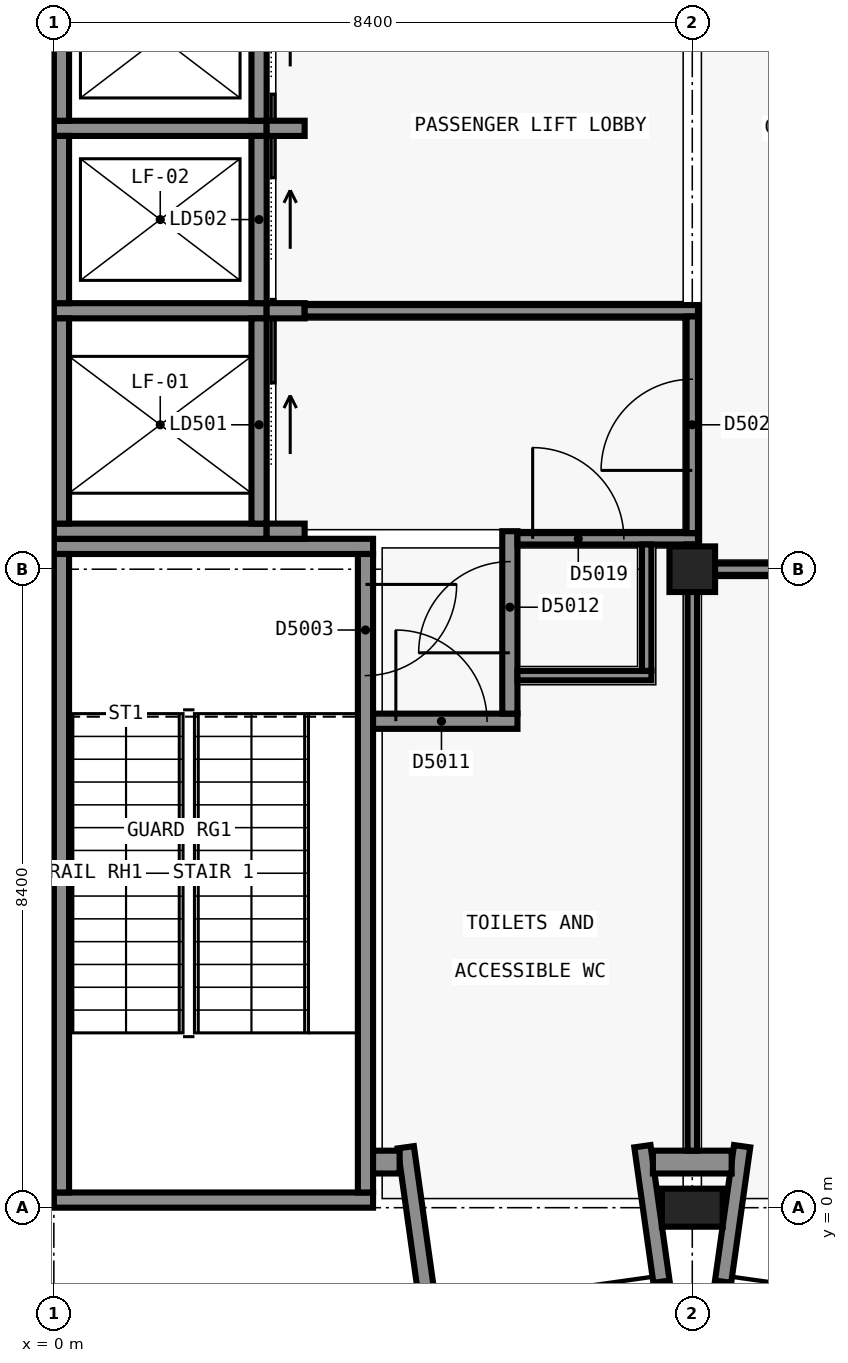
"""IFC4 building model, lengths in metres.
Left out: names, types, materials, properties, quantities, classifications, styles, units other than length and angle.
Written with IfcOpenShell. Run it as: python <this file> out.ifc"""

import sys

from ifc_helpers import new_model, si_unit, direction, frame, frame_2d, origin, origin_2d, place, context, subcontext, project, spatial, rectangle, extrude, element, fill, save


model = new_model("IFC4")
c1 = context("Model", 3, precision=1e-05, world=origin(), true_north=direction((0.0, 1.0)))
c2 = subcontext(c1, "Body", "Model", "MODEL_VIEW")
j1 = project(units=[si_unit("LENGTHUNIT", "METRE"), si_unit("PLANEANGLEUNIT", "RADIAN")], contexts=[c1])
p1 = place(None, origin())
s1 = spatial("IfcSite", under=j1, at=p1, CompositionType="ELEMENT")
p2 = place(p1, origin())
s2 = spatial("IfcBuilding", under=s1, at=p2, CompositionType="ELEMENT")
p3 = place(p2, frame((0.0, 0.0, 24.6)))
s3 = spatial("IfcBuildingStorey", under=s2, at=p3, CompositionType="ELEMENT", Elevation=24.6)
for number, where, z_axis, x_axis in (
    (1, (4.2, 0.1, 0.0), (0.0, 0.0, 1.0), (-1.0, 0.0, 0.0)),
    (2, (0.0, 8.7, 0.0), (0.0, 0.0, 1.0), (1.0, 0.0, 0.0)),
):
    element("IfcWall", number, at=place(p3, frame(where, z_axis=z_axis, x_axis=x_axis)), inside=s3, PredefinedType="SHEAR", context=c2, shape_type="SweptSolid", body=[
        extrude(rectangle(XDim=4.199, YDim=0.2, at=frame_2d((2.1, 0.0))), origin(), (0.0, 0.0, 1.0), 4.5),
    ])
p4 = place(p3, frame((0.1, 0.2, 0.0), z_axis=(0.0, 0.0, 1.0), x_axis=(0.0, 1.0, 0.0)))
e3 = element("IfcWall", 3, at=p4, inside=s3, PredefinedType="SHEAR", context=c2, shape_type="SweptSolid", body=[
    extrude(rectangle(XDim=8.4, YDim=0.2, at=frame_2d((4.2, 0.0))), origin(), (0.0, 0.0, 1.0), 4.5),
])
p5 = place(p3, frame((4.1, 8.6, 0.0), z_axis=(0.0, 0.0, 1.0), x_axis=(0.0, -1.0, 0.0)))
e4 = element("IfcWall", 4, at=p5, inside=s3, PredefinedType="SHEAR", context=c2, shape_type="SweptSolid", body=[
    extrude(rectangle(XDim=8.4, YDim=0.2, at=frame_2d((4.2, 0.0))), origin(), (0.0, 0.0, 1.0), 4.5),
])
p6 = place(p5, frame((0.4, 0.0, 0.0)))
e5 = element("IfcOpeningElement", 5, at=p6, cuts=e4, PredefinedType="OPENING", context=c2, shape_type="SweptSolid", body=[
    extrude(rectangle(XDim=1.2, YDim=2.1, at=frame_2d((0.6, 1.05))), frame((0.0, 0.11, 0.0), z_axis=(0.0, -1.0, 0.0), x_axis=(1.0, 0.0, 0.0)), (0.0, 0.0, 1.0), 0.22),
])
for number, where, z_axis, x_axis in (
    (6, (2.8, 8.9, 0.0), (0.0, 0.0, 1.0), (-1.0, 0.0, 0.0)),
    (7, (0.0, 11.8, 0.0), (0.0, 0.0, 1.0), (1.0, 0.0, 0.0)),
):
    element("IfcWall", number, at=place(p3, frame(where, z_axis=z_axis, x_axis=x_axis)), inside=s3, PredefinedType="SHEAR", context=c2, shape_type="SweptSolid", body=[
        extrude(rectangle(XDim=2.8, YDim=0.2, at=frame_2d((1.4, 0.0))), origin(), (0.0, 0.0, 1.0), 4.5),
    ])
p7 = place(p3, frame((0.1, 9.0, 0.0), z_axis=(0.0, 0.0, 1.0), x_axis=(0.0, 1.0, 0.0)))
e8 = element("IfcWall", 8, at=p7, inside=s3, PredefinedType="SHEAR", context=c2, shape_type="SweptSolid", body=[
    extrude(rectangle(XDim=2.7, YDim=0.2, at=frame_2d((1.35, 0.0))), origin(), (0.0, 0.0, 1.0), 4.5),
])
p8 = place(p3, frame((2.7, 11.7, 0.0), z_axis=(0.0, 0.0, 1.0), x_axis=(0.0, -1.0, 0.0)))
e9 = element("IfcWall", 9, at=p8, inside=s3, PredefinedType="SHEAR", context=c2, shape_type="SweptSolid", body=[
    extrude(rectangle(XDim=2.7, YDim=0.2, at=frame_2d((1.35, 0.0))), origin(), (0.0, 0.0, 1.0), 4.5),
])
p9 = place(p8, frame((0.85, 0.0, 0.0)))
e10 = element("IfcOpeningElement", 10, at=p9, cuts=e9, PredefinedType="OPENING", context=c2, shape_type="SweptSolid", body=[
    extrude(rectangle(XDim=1.1, YDim=2.1, at=frame_2d((0.55, 1.05))), frame((0.0, 0.11, 0.0), z_axis=(0.0, -1.0, 0.0), x_axis=(1.0, 0.0, 0.0)), (0.0, 0.0, 1.0), 0.22),
])
p10 = place(p3, frame((0.0, 14.2, 0.0), z_axis=(0.0, 0.0, 1.0), x_axis=(1.0, 0.0, 0.0)))
e11 = element("IfcWall", 11, at=p10, inside=s3, PredefinedType="SHEAR", context=c2, shape_type="SweptSolid", body=[
    extrude(rectangle(XDim=2.8, YDim=0.2, at=frame_2d((1.4, 0.0))), origin(), (0.0, 0.0, 1.0), 4.5),
])
p11 = place(p3, frame((0.1, 11.9, 0.0), z_axis=(0.0, 0.0, 1.0), x_axis=(0.0, 1.0, 0.0)))
e12 = element("IfcWall", 12, at=p11, inside=s3, PredefinedType="SHEAR", context=c2, shape_type="SweptSolid", body=[
    extrude(rectangle(XDim=2.2, YDim=0.2, at=frame_2d((1.1, 0.0))), origin(), (0.0, 0.0, 1.0), 4.5),
])
p12 = place(p3, frame((2.7, 14.1, 0.0), z_axis=(0.0, 0.0, 1.0), x_axis=(0.0, -1.0, 0.0)))
e13 = element("IfcWall", 13, at=p12, inside=s3, PredefinedType="SHEAR", context=c2, shape_type="SweptSolid", body=[
    extrude(rectangle(XDim=2.2, YDim=0.2, at=frame_2d((1.1, 0.0))), origin(), (0.0, 0.0, 1.0), 4.5),
])
p13 = place(p12, frame((0.55, 0.0, 0.0)))
e14 = element("IfcOpeningElement", 14, at=p13, cuts=e13, PredefinedType="OPENING", context=c2, shape_type="SweptSolid", body=[
    extrude(rectangle(XDim=1.1, YDim=2.1, at=frame_2d((0.55, 1.05))), frame((0.0, 0.11, 0.0), z_axis=(0.0, -1.0, 0.0), x_axis=(1.0, 0.0, 0.0)), (0.0, 0.0, 1.0), 0.22),
])
p14 = place(p3, frame((0.1, 14.3, 0.0), z_axis=(0.0, 0.0, 1.0), x_axis=(0.0, 1.0, 0.0)))
e15 = element("IfcWall", 15, at=p14, inside=s3, PredefinedType="SHEAR", context=c2, shape_type="SweptSolid", body=[
    extrude(rectangle(XDim=2.1, YDim=0.2, at=frame_2d((1.05, 0.0))), origin(), (0.0, 0.0, 1.0), 4.5),
])
p15 = place(p3, frame((2.7, 16.4, 0.0), z_axis=(0.0, 0.0, 1.0), x_axis=(0.0, -1.0, 0.0)))
e16 = element("IfcWall", 16, at=p15, inside=s3, PredefinedType="SHEAR", context=c2, shape_type="SweptSolid", body=[
    extrude(rectangle(XDim=2.1, YDim=0.2, at=frame_2d((1.05, 0.0))), origin(), (0.0, 0.0, 1.0), 4.5),
])
p16 = place(p15, frame((0.45, 0.0, 0.0)))
e17 = element("IfcOpeningElement", 17, at=p16, cuts=e16, PredefinedType="OPENING", context=c2, shape_type="SweptSolid", body=[
    extrude(rectangle(XDim=1.1, YDim=2.1, at=frame_2d((0.55, 1.05))), frame((0.0, 0.11, 0.0), z_axis=(0.0, -1.0, 0.0), x_axis=(1.0, 0.0, 0.0)), (0.0, 0.0, 1.0), 0.22),
])
p17 = place(p3, frame((8.4, 0.0, 0.0), z_axis=(0.0, 0.0, 1.0), x_axis=(1.0, 0.0, 0.0)))
e18 = element("IfcColumn", 18, at=p17, inside=s3, PredefinedType="COLUMN", context=c2, shape_type="SweptSolid", body=[
    extrude(rectangle(XDim=0.8, YDim=0.5, at=origin_2d()), origin(), (0.0, 0.0, 1.0), 4.5),
])
p18 = place(p3, frame((8.4, 8.4, 0.0), z_axis=(0.0, 0.0, 1.0), x_axis=(1.0, 0.0, 0.0)))
e19 = element("IfcColumn", 19, at=p18, inside=s3, PredefinedType="COLUMN", context=c2, shape_type="SweptSolid", body=[
    extrude(rectangle(XDim=0.6, YDim=0.6, at=origin_2d()), origin(), (0.0, 0.0, 1.0), 4.5),
])
for number, where, z_axis, x_axis in (
    (20, (3.3, 8.9, 0.0), (0.0, 0.0, 1.0), (-1.0, 0.0, 0.0)),
    (21, (2.8, 11.8, 0.0), (0.0, 0.0, 1.0), (1.0, 0.0, 0.0)),
    (22, (2.8, 14.2, 0.0), (0.0, 0.0, 1.0), (1.0, 0.0, 0.0)),
):
    element("IfcWall", number, at=place(p3, frame(where, z_axis=z_axis, x_axis=x_axis)), inside=s3, PredefinedType="SHEAR", context=c2, shape_type="SweptSolid", body=[
        extrude(rectangle(XDim=0.5, YDim=0.2, at=frame_2d((0.25, 0.0))), origin(), (0.0, 0.0, 1.0), 4.5),
    ])
p19 = place(p3, frame((4.631, 0.795, 0.0), z_axis=(0.0, 0.0, 1.0), x_axis=(0.139141913905, -0.990272451295, 0.0)))
e23 = element("IfcWall", 23, at=p19, inside=s3, PredefinedType="SOLIDWALL", context=c2, shape_type="SweptSolid", body=[
    extrude(rectangle(XDim=2.219, YDim=0.215, at=frame_2d((1.11, 0.0))), origin(), (0.0, 0.0, 1.0), 4.2),
])
for number, where, z_axis, x_axis in (
    (24, (7.744, 0.809, 0.0), (0.0, 0.0, 1.0), (0.139, -0.99, 0.0)),
    (25, (9.056, 0.809, 0.0), (0.0, 0.0, 1.0), (-0.139, -0.99, 0.0)),
):
    element("IfcWall", number, at=place(p3, frame(where, z_axis=z_axis, x_axis=x_axis)), inside=s3, PredefinedType="SOLIDWALL", context=c2, shape_type="SweptSolid", body=[
        extrude(rectangle(XDim=1.8, YDim=0.215, at=frame_2d((0.9, 0.0))), origin(), (0.0, 0.0, 1.0), 4.2),
    ])
p20 = place(p3, frame((4.55, 0.6, 0.0), z_axis=(0.0, 0.0, 1.0), x_axis=(-1.0, 0.0, 0.0)))
e26 = element("IfcWall", 26, at=p20, inside=s3, PredefinedType="SOLIDWALL", context=c2, shape_type="SweptSolid", body=[
    extrude(rectangle(XDim=0.349, YDim=0.3, at=frame_2d((0.175, 0.0))), origin(), (0.0, 0.0, 1.0), 4.2),
])
p21 = place(p3, frame((8.918, 0.6, 0.0), z_axis=(0.0, 0.0, 1.0), x_axis=(-1.0, 0.0, 0.0)))
e27 = element("IfcWall", 27, at=p21, inside=s3, PredefinedType="SOLIDWALL", context=c2, shape_type="SweptSolid", body=[
    extrude(rectangle(XDim=1.036, YDim=0.3, at=frame_2d((0.518, 0.0))), origin(), (0.0, 0.0, 1.0), 4.2),
])
p22 = place(p3, frame((4.2, 6.4, 0.0), z_axis=(0.0, 0.0, 1.0), x_axis=(1.0, 0.0, 0.0)))
e28 = element("IfcWall", 28, at=p22, inside=s3, PredefinedType="SOLIDWALL", context=c2, shape_type="SweptSolid", body=[
    extrude(rectangle(XDim=1.9, YDim=0.2, at=frame_2d((0.95, 0.0))), origin(), (0.0, 0.0, 1.0), 4.2),
])
p23 = place(p22, frame((0.3, 0.0, 0.0)))
e29 = element("IfcOpeningElement", 29, at=p23, cuts=e28, PredefinedType="OPENING", context=c2, shape_type="SweptSolid", body=[
    extrude(rectangle(XDim=1.2, YDim=2.1, at=frame_2d((0.6, 1.05))), frame((0.0, 0.11, 0.0), z_axis=(0.0, -1.0, 0.0), x_axis=(1.0, 0.0, 0.0)), (0.0, 0.0, 1.0), 0.22),
])
p24 = place(p3, frame((6.0, 6.5, 0.0), z_axis=(0.0, 0.0, 1.0), x_axis=(0.0, 1.0, 0.0)))
e30 = element("IfcWall", 30, at=p24, inside=s3, PredefinedType="SOLIDWALL", context=c2, shape_type="SweptSolid", body=[
    extrude(rectangle(XDim=2.4, YDim=0.2, at=frame_2d((1.2, 0.0))), origin(), (0.0, 0.0, 1.0), 3.7),
])
p25 = place(p24, frame((0.8, 0.0, 0.0)))
e31 = element("IfcOpeningElement", 31, at=p25, cuts=e30, PredefinedType="OPENING", context=c2, shape_type="SweptSolid", body=[
    extrude(rectangle(XDim=1.2, YDim=2.1, at=frame_2d((0.6, 1.05))), frame((0.0, 0.11, 0.0), z_axis=(0.0, -1.0, 0.0), x_axis=(1.0, 0.0, 0.0)), (0.0, 0.0, 1.0), 0.22),
])
p26 = place(p3, frame((8.325, 8.4, 0.0), z_axis=(0.0, 0.0, 1.0), x_axis=(1.0, 0.0, 0.0)))
e32 = element("IfcWall", 32, at=p26, inside=s3, PredefinedType="PARTITIONING", context=c2, shape_type="SweptSolid", body=[
    extrude(rectangle(XDim=4.35, YDim=0.15, at=frame_2d((2.175, 0.0))), origin(), (0.0, 0.0, 1.0), 3.5),
])
p27 = place(p3, frame((6.1, 8.8, 0.0), z_axis=(0.0, 0.0, 1.0), x_axis=(1.0, 0.0, 0.0)))
e33 = element("IfcWall", 33, at=p27, inside=s3, PredefinedType="SOLIDWALL", context=c2, shape_type="SweptSolid", body=[
    extrude(rectangle(XDim=2.375, YDim=0.15, at=frame_2d((1.188, 0.0))), origin(), (0.0, 0.0, 1.0), 3.5),
])
p28 = place(p27, frame((0.2, 0.0, 0.0)))
e34 = element("IfcOpeningElement", 34, at=p28, cuts=e33, PredefinedType="OPENING", context=c2, shape_type="SweptSolid", body=[
    extrude(rectangle(XDim=1.2, YDim=2.1, at=frame_2d((0.6, 1.05))), frame((0.0, 0.085, 0.0), z_axis=(0.0, -1.0, 0.0), x_axis=(1.0, 0.0, 0.0)), (0.0, 0.0, 1.0), 0.17),
])
p29 = place(p3, frame((3.3, 11.8, 0.0), z_axis=(0.0, 0.0, 1.0), x_axis=(1.0, 0.0, 0.0)))
e35 = element("IfcWall", 35, at=p29, inside=s3, PredefinedType="SOLIDWALL", context=c2, shape_type="SweptSolid", body=[
    extrude(rectangle(XDim=5.175, YDim=0.15, at=frame_2d((2.587, 0.0))), origin(), (0.0, 0.0, 1.0), 3.5),
])
p30 = place(p3, frame((8.4, 8.475, 0.0), z_axis=(0.0, 0.0, 1.0), x_axis=(0.0, 1.0, 0.0)))
e36 = element("IfcWall", 36, at=p30, inside=s3, PredefinedType="PARTITIONING", context=c2, shape_type="SweptSolid", body=[
    extrude(rectangle(XDim=0.25, YDim=0.15, at=frame_2d((0.125, 0.0))), origin(), (0.0, 0.0, 1.0), 3.5),
])
p31 = place(p3, frame((8.4, 8.875, 0.0), z_axis=(0.0, 0.0, 1.0), x_axis=(0.0, 1.0, 0.0)))
e37 = element("IfcWall", 37, at=p31, inside=s3, PredefinedType="SOLIDWALL", context=c2, shape_type="SweptSolid", body=[
    extrude(rectangle(XDim=2.85, YDim=0.15, at=frame_2d((1.425, 0.0))), origin(), (0.0, 0.0, 1.0), 3.5),
])
p32 = place(p31, frame((0.825, 0.0, 0.0)))
e38 = element("IfcOpeningElement", 38, at=p32, cuts=e37, PredefinedType="OPENING", context=c2, shape_type="SweptSolid", body=[
    extrude(rectangle(XDim=1.2, YDim=2.1, at=frame_2d((0.6, 1.05))), frame((0.0, 0.085, 0.0), z_axis=(0.0, -1.0, 0.0), x_axis=(1.0, 0.0, 0.0)), (0.0, 0.0, 1.0), 0.17),
])
p33 = place(p3, frame((6.1, 7.0, 0.0), z_axis=(0.0, 0.0, 1.0), x_axis=(1.0, 0.0, 0.0)))
e39 = element("IfcWall", 39, at=p33, inside=s3, PredefinedType="PARTITIONING", context=c2, shape_type="SweptSolid", body=[
    extrude(rectangle(XDim=1.762, YDim=0.125, at=frame_2d((0.881, 0.0))), origin(), (0.0, 0.0, 1.0), 4.2),
])
p34 = place(p3, frame((7.8, 7.062, 0.0), z_axis=(0.0, 0.0, 1.0), x_axis=(0.0, 1.0, 0.0)))
e40 = element("IfcWall", 40, at=p34, inside=s3, PredefinedType="PARTITIONING", context=c2, shape_type="SweptSolid", body=[
    extrude(rectangle(XDim=1.663, YDim=0.125, at=frame_2d((0.831, 0.0))), origin(), (0.0, 0.0, 1.0), 3.7),
])
p35 = place(p3, frame((8.4, 0.75, 0.0), z_axis=(0.0, 0.0, 1.0), x_axis=(0.0, 1.0, 0.0)))
e41 = element("IfcWall", 41, at=p35, inside=s3, PredefinedType="PARTITIONING", context=c2, shape_type="SweptSolid", body=[
    extrude(rectangle(XDim=7.575, YDim=0.125, at=frame_2d((3.788, 0.0))), origin(), (0.0, 0.0, 1.0), 3.5),
])
p36 = place(p9, origin())
e42 = element("IfcDoor", 42, at=p36, inside=s3, OperationType="SLIDING_TO_LEFT", PredefinedType="DOOR", context=c2, shape_type="SweptSolid", body=[
    extrude(rectangle(XDim=1.1, YDim=2.1, at=frame_2d((0.55, 1.05))), frame((0.0, 0.025, 0.0), z_axis=(0.0, -1.0, 0.0), x_axis=(1.0, 0.0, 0.0)), (0.0, 0.0, 1.0), 0.05),
])
fill(e10, e42)
p37 = place(p13, origin())
e43 = element("IfcDoor", 43, at=p37, inside=s3, OperationType="SLIDING_TO_LEFT", PredefinedType="DOOR", context=c2, shape_type="SweptSolid", body=[
    extrude(rectangle(XDim=1.1, YDim=2.1, at=frame_2d((0.55, 1.05))), frame((0.0, 0.025, 0.0), z_axis=(0.0, -1.0, 0.0), x_axis=(1.0, 0.0, 0.0)), (0.0, 0.0, 1.0), 0.05),
])
fill(e14, e43)
p38 = place(p16, origin())
e44 = element("IfcDoor", 44, at=p38, inside=s3, OperationType="SLIDING_TO_LEFT", PredefinedType="DOOR", context=c2, shape_type="SweptSolid", body=[
    extrude(rectangle(XDim=1.1, YDim=2.1, at=frame_2d((0.55, 1.05))), frame((0.0, 0.025, 0.0), z_axis=(0.0, -1.0, 0.0), x_axis=(1.0, 0.0, 0.0)), (0.0, 0.0, 1.0), 0.05),
])
fill(e17, e44)
p39 = place(p6, origin())
e45 = element("IfcDoor", 45, at=p39, inside=s3, OperationType="SINGLE_SWING_RIGHT", PredefinedType="DOOR", context=c2, shape_type="SweptSolid", body=[
    extrude(rectangle(XDim=1.2, YDim=2.1, at=frame_2d((0.6, 1.05))), frame((0.0, 0.025, 0.0), z_axis=(0.0, -1.0, 0.0), x_axis=(1.0, 0.0, 0.0)), (0.0, 0.0, 1.0), 0.05),
])
fill(e5, e45)
p40 = place(p23, origin())
e46 = element("IfcDoor", 46, at=p40, inside=s3, OperationType="SINGLE_SWING_LEFT", PredefinedType="DOOR", context=c2, shape_type="SweptSolid", body=[
    extrude(rectangle(XDim=1.2, YDim=2.1, at=frame_2d((0.6, 1.05))), frame((0.0, 0.025, 0.0), z_axis=(0.0, -1.0, 0.0), x_axis=(1.0, 0.0, 0.0)), (0.0, 0.0, 1.0), 0.05),
])
fill(e29, e46)
p41 = place(p25, origin())
e47 = element("IfcDoor", 47, at=p41, inside=s3, OperationType="SINGLE_SWING_RIGHT", PredefinedType="DOOR", context=c2, shape_type="SweptSolid", body=[
    extrude(rectangle(XDim=1.2, YDim=2.1, at=frame_2d((0.6, 1.05))), frame((0.0, 0.025, 0.0), z_axis=(0.0, -1.0, 0.0), x_axis=(1.0, 0.0, 0.0)), (0.0, 0.0, 1.0), 0.05),
])
fill(e31, e47)
p42 = place(p28, origin())
e48 = element("IfcDoor", 48, at=p42, inside=s3, OperationType="SINGLE_SWING_RIGHT", PredefinedType="DOOR", context=c2, shape_type="SweptSolid", body=[
    extrude(rectangle(XDim=1.2, YDim=2.1, at=frame_2d((0.6, 1.05))), frame((0.0, 0.025, 0.0), z_axis=(0.0, -1.0, 0.0), x_axis=(1.0, 0.0, 0.0)), (0.0, 0.0, 1.0), 0.05),
])
fill(e34, e48)
p43 = place(p32, origin())
e49 = element("IfcDoor", 49, at=p43, inside=s3, OperationType="SINGLE_SWING_RIGHT", PredefinedType="DOOR", context=c2, shape_type="SweptSolid", body=[
    extrude(rectangle(XDim=1.2, YDim=2.1, at=frame_2d((0.6, 1.05))), frame((0.0, 0.025, 0.0), z_axis=(0.0, -1.0, 0.0), x_axis=(1.0, 0.0, 0.0)), (0.0, 0.0, 1.0), 0.05),
])
fill(e38, e49)
save(model, sys.argv[1])
